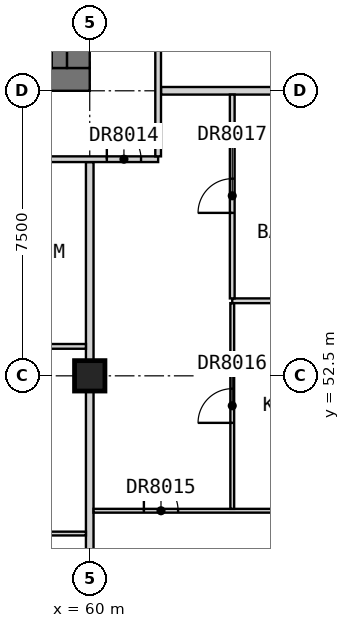
"""IFC4 building model, lengths in metres.
Left out: names, types, materials, properties, quantities, classifications, styles, units other than length and angle.
Written with IfcOpenShell. Run it as: python <this file> out.ifc"""

import sys

from ifc_helpers import new_model, si_unit, direction, frame, frame_2d, origin, origin_2d, place, context, subcontext, project, spatial, rectangle, extrude, element, fill, save


model = new_model("IFC4")
c1 = context("Model", 3, precision=1e-05, world=origin(), true_north=direction((0.0, 1.0)))
c2 = subcontext(c1, "Body", "Model", "MODEL_VIEW")
j1 = project(units=[si_unit("LENGTHUNIT", "METRE"), si_unit("PLANEANGLEUNIT", "RADIAN")], contexts=[c1])
p1 = place(None, origin())
s1 = spatial("IfcSite", under=j1, at=p1, CompositionType="ELEMENT")
p2 = place(p1, origin())
s2 = spatial("IfcBuilding", under=s1, at=p2, CompositionType="ELEMENT")
p3 = place(p2, frame((0.0, 0.0, 233.7)))
s3 = spatial("IfcBuildingStorey", under=s2, at=p3, CompositionType="ELEMENT", Elevation=233.7)
p4 = place(p3, frame((60.0, 52.5, 0.0), z_axis=(0.0, 0.0, 1.0), x_axis=(1.0, 0.0, 0.0)))
e1 = element("IfcColumn", 1, at=p4, inside=s3, PredefinedType="COLUMN", context=c2, shape_type="SweptSolid", body=[
    extrude(rectangle(XDim=0.8, YDim=0.8, at=origin_2d()), origin(), (0.0, 0.0, 1.0), 3.5),
])
p5 = place(p3, frame((30.0, 60.3, 0.0), z_axis=(0.0, 0.0, 1.0), x_axis=(1.0, 0.0, 0.0)))
e2 = element("IfcWall", 2, at=p5, inside=s3, PredefinedType="SHEAR", context=c2, shape_type="SweptSolid", body=[
    extrude(rectangle(XDim=30.0, YDim=0.6, at=frame_2d((15.0, 0.0))), origin(), (0.0, 0.0, 1.0), 3.5),
])
p6 = place(p5, frame((21.9, 0.0, 0.0)))
e3 = element("IfcOpeningElement", 3, at=p6, cuts=e2, PredefinedType="OPENING", context=c2, shape_type="SweptSolid", body=[
    extrude(rectangle(XDim=1.8, YDim=2.1, at=frame_2d((0.9, 1.05))), frame((0.0, 0.31, 0.0), z_axis=(0.0, -1.0, 0.0), x_axis=(1.0, 0.0, 0.0)), (0.0, 0.0, 1.0), 0.62),
])
p7 = place(p5, frame((26.5, 0.0, 0.0)))
e4 = element("IfcOpeningElement", 4, at=p7, cuts=e2, PredefinedType="OPENING", context=c2, shape_type="SweptSolid", body=[
    extrude(rectangle(XDim=1.2, YDim=2.1, at=frame_2d((0.6, 1.05))), frame((0.0, 0.31, 0.0), z_axis=(0.0, -1.0, 0.0), x_axis=(1.0, 0.0, 0.0)), (0.0, 0.0, 1.0), 0.62),
])
p8 = place(p3, frame((59.7, 60.6, 0.0), z_axis=(0.0, 0.0, 1.0), x_axis=(0.0, 1.0, 0.0)))
e5 = element("IfcWall", 5, at=p8, inside=s3, PredefinedType="SHEAR", context=c2, shape_type="SweptSolid", body=[
    extrude(rectangle(XDim=21.3, YDim=0.6, at=frame_2d((10.65, 0.0))), origin(), (0.0, 0.0, 1.0), 3.5),
])
p9 = place(p8, frame((14.9, 0.0, 0.0)))
e6 = element("IfcOpeningElement", 6, at=p9, cuts=e5, PredefinedType="OPENING", context=c2, shape_type="SweptSolid", body=[
    extrude(rectangle(XDim=1.8, YDim=2.1, at=frame_2d((0.9, 1.05))), frame((0.0, 0.31, 0.0), z_axis=(0.0, -1.0, 0.0), x_axis=(1.0, 0.0, 0.0)), (0.0, 0.0, 1.0), 0.62),
])
p10 = place(p3, frame((59.2, 60.6, 0.0), z_axis=(0.0, 0.0, 1.0), x_axis=(0.0, 1.0, 0.0)))
e7 = element("IfcWall", 7, at=p10, inside=s3, PredefinedType="SOLIDWALL", context=c2, shape_type="SweptSolid", body=[
    extrude(rectangle(XDim=7.9, YDim=0.4, at=frame_2d((3.95, 0.0))), origin(), (0.0, 0.0, 1.0), 3.25),
])
for number, where, z_axis, x_axis in (
    (8, (61.875, 60.0, 0.0), (0.0, 0.0, 1.0), (1.0, 0.0, 0.0)),
    (9, (60.0, 41.25, 0.0), (0.0, 0.0, 1.0), (0.0, 1.0, 0.0)),
):
    element("IfcWall", number, at=place(p3, frame(where, z_axis=z_axis, x_axis=x_axis)), inside=s3, PredefinedType="PARTITIONING", context=c2, shape_type="SweptSolid", body=[
        extrude(rectangle(XDim=16.875, YDim=0.2, at=frame_2d((8.438, 0.0))), origin(), (0.0, 0.0, 1.0), 3.25),
    ])
p11 = place(p3, frame((33.75, 58.2, 0.0), z_axis=(0.0, 0.0, 1.0), x_axis=(1.0, 0.0, 0.0)))
e10 = element("IfcWall", 10, at=p11, inside=s3, PredefinedType="PARTITIONING", context=c2, shape_type="SweptSolid", body=[
    extrude(rectangle(XDim=28.05, YDim=0.15, at=frame_2d((14.025, 0.0))), origin(), (0.0, 0.0, 1.0), 3.25),
])
p12 = place(p11, frame((3.25, 0.0, 0.0)))
e11 = element("IfcOpeningElement", 11, at=p12, cuts=e10, PredefinedType="OPENING", context=c2, shape_type="SweptSolid", body=[
    extrude(rectangle(XDim=1.0, YDim=2.1, at=frame_2d((0.5, 1.05))), frame((0.0, 0.085, 0.0), z_axis=(0.0, -1.0, 0.0), x_axis=(1.0, 0.0, 0.0)), (0.0, 0.0, 1.0), 0.17),
])
p13 = place(p11, frame((8.925, 0.0, 0.0)))
e12 = element("IfcOpeningElement", 12, at=p13, cuts=e10, PredefinedType="OPENING", context=c2, shape_type="SweptSolid", body=[
    extrude(rectangle(XDim=0.9, YDim=2.1, at=frame_2d((0.45, 1.05))), frame((0.0, 0.085, 0.0), z_axis=(0.0, -1.0, 0.0), x_axis=(1.0, 0.0, 0.0)), (0.0, 0.0, 1.0), 0.17),
])
p14 = place(p11, frame((20.175, 0.0, 0.0)))
e13 = element("IfcOpeningElement", 13, at=p14, cuts=e10, PredefinedType="OPENING", context=c2, shape_type="SweptSolid", body=[
    extrude(rectangle(XDim=0.9, YDim=2.1, at=frame_2d((0.45, 1.05))), frame((0.0, 0.085, 0.0), z_axis=(0.0, -1.0, 0.0), x_axis=(1.0, 0.0, 0.0)), (0.0, 0.0, 1.0), 0.17),
])
p15 = place(p11, frame((26.7, 0.0, 0.0)))
e14 = element("IfcOpeningElement", 14, at=p15, cuts=e10, PredefinedType="OPENING", context=c2, shape_type="SweptSolid", body=[
    extrude(rectangle(XDim=0.9, YDim=2.1, at=frame_2d((0.45, 1.05))), frame((0.0, 0.085, 0.0), z_axis=(0.0, -1.0, 0.0), x_axis=(1.0, 0.0, 0.0)), (0.0, 0.0, 1.0), 0.17),
])
p16 = place(p3, frame((61.8, 58.275, 0.0), z_axis=(0.0, 0.0, 1.0), x_axis=(0.0, 1.0, 0.0)))
e15 = element("IfcWall", 15, at=p16, inside=s3, PredefinedType="PARTITIONING", context=c2, shape_type="SweptSolid", body=[
    extrude(rectangle(XDim=25.95, YDim=0.15, at=frame_2d((12.975, 0.0))), origin(), (0.0, 0.0, 1.0), 3.25),
])
p17 = place(p16, frame((4.575, 0.0, 0.0)))
e16 = element("IfcOpeningElement", 16, at=p17, cuts=e15, PredefinedType="OPENING", context=c2, shape_type="SweptSolid", body=[
    extrude(rectangle(XDim=1.8, YDim=2.1, at=frame_2d((0.9, 1.05))), frame((0.0, 0.085, 0.0), z_axis=(0.0, -1.0, 0.0), x_axis=(1.0, 0.0, 0.0)), (0.0, 0.0, 1.0), 0.17),
])
p18 = place(p16, frame((14.4, 0.0, 0.0)))
e17 = element("IfcOpeningElement", 17, at=p18, cuts=e15, PredefinedType="OPENING", context=c2, shape_type="SweptSolid", body=[
    extrude(rectangle(XDim=0.9, YDim=2.1, at=frame_2d((0.45, 1.05))), frame((0.0, 0.085, 0.0), z_axis=(0.0, -1.0, 0.0), x_axis=(1.0, 0.0, 0.0)), (0.0, 0.0, 1.0), 0.17),
])
p19 = place(p3, frame((41.35, 48.35, 0.0), z_axis=(0.0, 0.0, 1.0), x_axis=(1.0, 0.0, 0.0)))
e18 = element("IfcWall", 18, at=p19, inside=s3, PredefinedType="PARTITIONING", context=c2, shape_type="SweptSolid", body=[
    extrude(rectangle(XDim=18.55, YDim=0.1, at=frame_2d((9.275, 0.0))), origin(), (0.0, 0.0, 1.0), 3.25),
])
p20 = place(p19, frame((1.325, 0.0, 0.0)))
e19 = element("IfcOpeningElement", 19, at=p20, cuts=e18, PredefinedType="OPENING", context=c2, shape_type="SweptSolid", body=[
    extrude(rectangle(XDim=0.9, YDim=2.1, at=frame_2d((0.45, 1.05))), frame((0.0, 0.06, 0.0), z_axis=(0.0, -1.0, 0.0), x_axis=(1.0, 0.0, 0.0)), (0.0, 0.0, 1.0), 0.12),
])
p21 = place(p19, frame((8.825, 0.0, 0.0)))
e20 = element("IfcOpeningElement", 20, at=p21, cuts=e18, PredefinedType="OPENING", context=c2, shape_type="SweptSolid", body=[
    extrude(rectangle(XDim=0.9, YDim=2.1, at=frame_2d((0.45, 1.05))), frame((0.0, 0.06, 0.0), z_axis=(0.0, -1.0, 0.0), x_axis=(1.0, 0.0, 0.0)), (0.0, 0.0, 1.0), 0.12),
])
p22 = place(p19, frame((12.575, 0.0, 0.0)))
e21 = element("IfcOpeningElement", 21, at=p22, cuts=e18, PredefinedType="OPENING", context=c2, shape_type="SweptSolid", body=[
    extrude(rectangle(XDim=0.9, YDim=2.1, at=frame_2d((0.45, 1.05))), frame((0.0, 0.06, 0.0), z_axis=(0.0, -1.0, 0.0), x_axis=(1.0, 0.0, 0.0)), (0.0, 0.0, 1.0), 0.12),
])
p23 = place(p3, frame((60.1, 48.95, 0.0), z_axis=(0.0, 0.0, 1.0), x_axis=(1.0, 0.0, 0.0)))
e22 = element("IfcWall", 22, at=p23, inside=s3, PredefinedType="PARTITIONING", context=c2, shape_type="SweptSolid", body=[
    extrude(rectangle(XDim=17.84, YDim=0.1, at=frame_2d((8.92, 0.0))), origin(), (0.0, 0.0, 1.0), 3.25),
])
p24 = place(p23, frame((1.325, 0.0, 0.0)))
e23 = element("IfcOpeningElement", 23, at=p24, cuts=e22, PredefinedType="OPENING", context=c2, shape_type="SweptSolid", body=[
    extrude(rectangle(XDim=0.9, YDim=2.1, at=frame_2d((0.45, 1.05))), frame((0.0, 0.06, 0.0), z_axis=(0.0, -1.0, 0.0), x_axis=(1.0, 0.0, 0.0)), (0.0, 0.0, 1.0), 0.12),
])
p25 = place(p23, frame((8.825, 0.0, 0.0)))
e24 = element("IfcOpeningElement", 24, at=p25, cuts=e22, PredefinedType="OPENING", context=c2, shape_type="SweptSolid", body=[
    extrude(rectangle(XDim=0.9, YDim=2.1, at=frame_2d((0.45, 1.05))), frame((0.0, 0.06, 0.0), z_axis=(0.0, -1.0, 0.0), x_axis=(1.0, 0.0, 0.0)), (0.0, 0.0, 1.0), 0.12),
])
p26 = place(p23, frame((13.725, 0.0, 0.0)))
e25 = element("IfcOpeningElement", 25, at=p26, cuts=e22, PredefinedType="OPENING", context=c2, shape_type="SweptSolid", body=[
    extrude(rectangle(XDim=0.9, YDim=2.1, at=frame_2d((0.45, 1.05))), frame((0.0, 0.06, 0.0), z_axis=(0.0, -1.0, 0.0), x_axis=(1.0, 0.0, 0.0)), (0.0, 0.0, 1.0), 0.12),
])
p27 = place(p23, frame((16.325, 0.0, 0.0)))
e26 = element("IfcOpeningElement", 26, at=p27, cuts=e22, PredefinedType="OPENING", context=c2, shape_type="SweptSolid", body=[
    extrude(rectangle(XDim=0.9, YDim=2.1, at=frame_2d((0.45, 1.05))), frame((0.0, 0.06, 0.0), z_axis=(0.0, -1.0, 0.0), x_axis=(1.0, 0.0, 0.0)), (0.0, 0.0, 1.0), 0.12),
])
p28 = place(p3, frame((63.75, 49.0, 0.0), z_axis=(0.0, 0.0, 1.0), x_axis=(0.0, 1.0, 0.0)))
e27 = element("IfcWall", 27, at=p28, inside=s3, PredefinedType="PARTITIONING", context=c2, shape_type="SweptSolid", body=[
    extrude(rectangle(XDim=5.413, YDim=0.1, at=frame_2d((2.706, 0.0))), origin(), (0.0, 0.0, 1.0), 3.25),
])
p29 = place(p28, frame((2.262, 0.0, 0.0)))
e28 = element("IfcOpeningElement", 28, at=p29, cuts=e27, PredefinedType="OPENING", context=c2, shape_type="SweptSolid", body=[
    extrude(rectangle(XDim=0.9, YDim=2.1, at=frame_2d((0.45, 1.05))), frame((0.0, 0.06, 0.0), z_axis=(0.0, -1.0, 0.0), x_axis=(1.0, 0.0, 0.0)), (0.0, 0.0, 1.0), 0.12),
])
p30 = place(p3, frame((56.25, 53.275, 0.0), z_axis=(0.0, 0.0, 1.0), x_axis=(1.0, 0.0, 0.0)))
e29 = element("IfcWall", 29, at=p30, inside=s3, PredefinedType="PARTITIONING", context=c2, shape_type="SweptSolid", body=[
    extrude(rectangle(XDim=3.65, YDim=0.125, at=frame_2d((1.825, 0.0))), origin(), (0.0, 0.0, 1.0), 3.25),
])
p31 = place(p3, frame((63.75, 54.475, 0.0), z_axis=(0.0, 0.0, 1.0), x_axis=(1.0, 0.0, 0.0)))
e30 = element("IfcWall", 30, at=p31, inside=s3, PredefinedType="PARTITIONING", context=c2, shape_type="SweptSolid", body=[
    extrude(rectangle(XDim=11.25, YDim=0.125, at=frame_2d((5.625, 0.0))), origin(), (0.0, 0.0, 1.0), 3.25),
])
p32 = place(p31, frame((5.175, 0.0, 0.0)))
e31 = element("IfcOpeningElement", 31, at=p32, cuts=e30, PredefinedType="OPENING", context=c2, shape_type="SweptSolid", body=[
    extrude(rectangle(XDim=0.9, YDim=2.1, at=frame_2d((0.45, 1.05))), frame((0.0, 0.073, 0.0), z_axis=(0.0, -1.0, 0.0), x_axis=(1.0, 0.0, 0.0)), (0.0, 0.0, 1.0), 0.145),
])
p33 = place(p31, frame((8.925, 0.0, 0.0)))
e32 = element("IfcOpeningElement", 32, at=p33, cuts=e30, PredefinedType="OPENING", context=c2, shape_type="SweptSolid", body=[
    extrude(rectangle(XDim=0.9, YDim=2.1, at=frame_2d((0.45, 1.05))), frame((0.0, 0.073, 0.0), z_axis=(0.0, -1.0, 0.0), x_axis=(1.0, 0.0, 0.0)), (0.0, 0.0, 1.0), 0.145),
])
p34 = place(p3, frame((63.75, 54.538, 0.0), z_axis=(0.0, 0.0, 1.0), x_axis=(0.0, 1.0, 0.0)))
e33 = element("IfcWall", 33, at=p34, inside=s3, PredefinedType="PARTITIONING", context=c2, shape_type="SweptSolid", body=[
    extrude(rectangle(XDim=5.362, YDim=0.125, at=frame_2d((2.681, 0.0))), origin(), (0.0, 0.0, 1.0), 3.25),
])
p35 = place(p34, frame((2.25, 0.0, 0.0)))
e34 = element("IfcOpeningElement", 34, at=p35, cuts=e33, PredefinedType="OPENING", context=c2, shape_type="SweptSolid", body=[
    extrude(rectangle(XDim=0.9, YDim=2.1, at=frame_2d((0.45, 1.05))), frame((0.0, 0.073, 0.0), z_axis=(0.0, -1.0, 0.0), x_axis=(1.0, 0.0, 0.0)), (0.0, 0.0, 1.0), 0.145),
])
p36 = place(p15, origin())
e35 = element("IfcDoor", 35, at=p36, inside=s3, OperationType="SINGLE_SWING_RIGHT", PredefinedType="DOOR", context=c2, shape_type="SweptSolid", body=[
    extrude(rectangle(XDim=0.9, YDim=2.1, at=frame_2d((0.45, 1.05))), frame((0.0, 0.025, 0.0), z_axis=(0.0, -1.0, 0.0), x_axis=(1.0, 0.0, 0.0)), (0.0, 0.0, 1.0), 0.05),
])
fill(e14, e35)
p37 = place(p24, origin())
e36 = element("IfcDoor", 36, at=p37, inside=s3, OperationType="SINGLE_SWING_LEFT", PredefinedType="DOOR", context=c2, shape_type="SweptSolid", body=[
    extrude(rectangle(XDim=0.9, YDim=2.1, at=frame_2d((0.45, 1.05))), frame((0.0, 0.025, 0.0), z_axis=(0.0, -1.0, 0.0), x_axis=(1.0, 0.0, 0.0)), (0.0, 0.0, 1.0), 0.05),
])
fill(e23, e36)
p38 = place(p29, origin())
e37 = element("IfcDoor", 37, at=p38, inside=s3, OperationType="SINGLE_SWING_RIGHT", PredefinedType="DOOR", context=c2, shape_type="SweptSolid", body=[
    extrude(rectangle(XDim=0.9, YDim=2.1, at=frame_2d((0.45, 1.05))), frame((0.0, 0.025, 0.0), z_axis=(0.0, -1.0, 0.0), x_axis=(1.0, 0.0, 0.0)), (0.0, 0.0, 1.0), 0.05),
])
fill(e28, e37)
p39 = place(p35, origin())
e38 = element("IfcDoor", 38, at=p39, inside=s3, OperationType="SINGLE_SWING_RIGHT", PredefinedType="DOOR", context=c2, shape_type="SweptSolid", body=[
    extrude(rectangle(XDim=0.9, YDim=2.1, at=frame_2d((0.45, 1.05))), frame((0.0, 0.025, 0.0), z_axis=(0.0, -1.0, 0.0), x_axis=(1.0, 0.0, 0.0)), (0.0, 0.0, 1.0), 0.05),
])
fill(e34, e38)
save(model, sys.argv[1])
